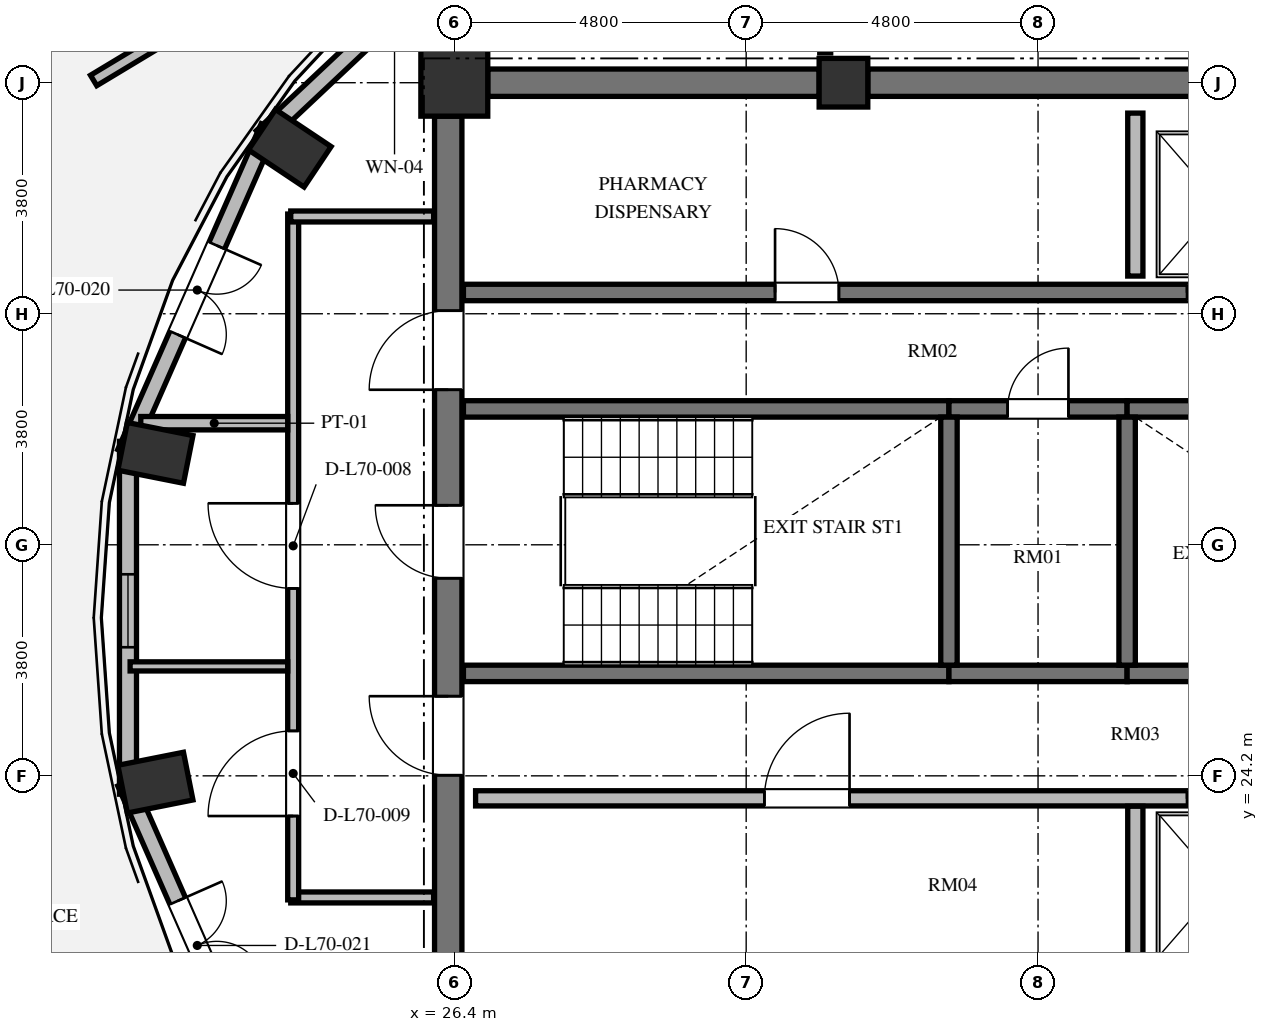
"""IFC4 building model, lengths in metres.
Left out: names, types, materials, properties, quantities, classifications, styles, units other than length and angle.
Written with IfcOpenShell. Run it as: python <this file> out.ifc"""

import sys

from ifc_helpers import new_model, si_unit, direction, frame, frame_2d, origin, origin_2d, place, context, subcontext, project, spatial, rectangle, extrude, element, fill, save


model = new_model("IFC4")
c1 = context("Model", 3, precision=1e-05, world=origin(), true_north=direction((0.0, 1.0)))
c2 = subcontext(c1, "Body", "Model", "MODEL_VIEW")
j1 = project(units=[si_unit("LENGTHUNIT", "METRE"), si_unit("PLANEANGLEUNIT", "RADIAN")], contexts=[c1])
p1 = place(None, origin())
s1 = spatial("IfcSite", under=j1, at=p1, CompositionType="ELEMENT")
p2 = place(p1, origin())
s2 = spatial("IfcBuilding", under=s1, at=p2, CompositionType="ELEMENT")
p3 = place(p2, frame((0.0, 0.0, 269.616)))
s3 = spatial("IfcBuildingStorey", under=s2, at=p3, CompositionType="ELEMENT", Elevation=269.616)
for number, where, z_axis, x_axis in (
    (1, (23.694, 34.522, 0.0), (0.0, 0.0, 1.0), (-0.831, 0.556, 0.0)),
    (2, (21.484, 29.512, 0.0), (0.0, 0.0, 1.0), (-0.981, 0.195, 0.0)),
    (3, (21.484, 24.088, 0.0), (0.0, 0.0, 1.0), (-0.981, -0.195, 0.0)),
):
    element("IfcColumn", number, at=place(p3, frame(where, z_axis=z_axis, x_axis=x_axis)), inside=s3, PredefinedType="COLUMN", context=c2, shape_type="SweptSolid", body=[
        extrude(rectangle(XDim=1.1, YDim=0.8, at=origin_2d()), origin(), (0.0, 0.0, 1.0), 3.648),
    ])
p4 = place(p3, frame((32.8, 35.6, 0.0), z_axis=(0.0, 0.0, 1.0), x_axis=(1.0, 0.0, 0.0)))
e4 = element("IfcColumn", 4, at=p4, inside=s3, PredefinedType="COLUMN", context=c2, shape_type="SweptSolid", body=[
    extrude(rectangle(XDim=0.8, YDim=0.8, at=origin_2d()), origin(), (0.0, 0.0, 1.0), 3.648),
])
p5 = place(p3, frame((26.4, 35.6, 0.0), z_axis=(0.0, 0.0, 1.0), x_axis=(1.0, 0.0, 0.0)))
e5 = element("IfcColumn", 5, at=p5, inside=s3, PredefinedType="COLUMN", context=c2, shape_type="SweptSolid", body=[
    extrude(rectangle(XDim=1.1, YDim=1.1, at=origin_2d()), origin(), (0.0, 0.0, 1.0), 3.648),
])
p6 = place(p3, frame((26.3, 20.95, 0.0), z_axis=(0.0, 0.0, 1.0), x_axis=(0.0, 1.0, 0.0)))
e6 = element("IfcWall", 6, at=p6, inside=s3, PredefinedType="SHEAR", context=c2, shape_type="SweptSolid", body=[
    extrude(rectangle(XDim=14.1, YDim=0.45, at=frame_2d((7.05, 0.0))), origin(), (0.0, 0.0, 1.0), 3.648),
])
p7 = place(p6, frame((6.5, 0.0, 0.0)))
e7 = element("IfcOpeningElement", 7, at=p7, cuts=e6, PredefinedType="OPENING", context=c2, shape_type="SweptSolid", body=[
    extrude(rectangle(XDim=1.2, YDim=2.15, at=frame_2d((0.6, 1.075))), frame((0.0, 0.235, 0.0), z_axis=(0.0, -1.0, 0.0), x_axis=(1.0, 0.0, 0.0)), (0.0, 0.0, 1.0), 0.47),
])
p8 = place(p6, frame((9.6, 0.0, 0.0)))
e8 = element("IfcOpeningElement", 8, at=p8, cuts=e6, PredefinedType="OPENING", context=c2, shape_type="SweptSolid", body=[
    extrude(rectangle(XDim=1.3, YDim=2.2, at=frame_2d((0.65, 1.1))), frame((0.0, 0.235, 0.0), z_axis=(0.0, -1.0, 0.0), x_axis=(1.0, 0.0, 0.0)), (0.0, 0.0, 1.0), 0.47),
])
p9 = place(p6, frame((3.26, 0.0, 0.0)))
e9 = element("IfcOpeningElement", 9, at=p9, cuts=e6, PredefinedType="OPENING", context=c2, shape_type="SweptSolid", body=[
    extrude(rectangle(XDim=1.3, YDim=2.2, at=frame_2d((0.65, 1.1))), frame((0.0, 0.235, 0.0), z_axis=(0.0, -1.0, 0.0), x_axis=(1.0, 0.0, 0.0)), (0.0, 0.0, 1.0), 0.47),
])
p10 = place(p3, frame((26.95, 35.6, 0.0), z_axis=(0.0, 0.0, 1.0), x_axis=(1.0, 0.0, 0.0)))
e10 = element("IfcWall", 10, at=p10, inside=s3, PredefinedType="SHEAR", context=c2, shape_type="SweptSolid", body=[
    extrude(rectangle(XDim=5.45, YDim=0.45, at=frame_2d((2.725, 0.0))), origin(), (0.0, 0.0, 1.0), 3.648),
])
p11 = place(p3, frame((33.2, 35.6, 0.0), z_axis=(0.0, 0.0, 1.0), x_axis=(1.0, 0.0, 0.0)))
e11 = element("IfcWall", 11, at=p11, inside=s3, PredefinedType="SHEAR", context=c2, shape_type="SweptSolid", body=[
    extrude(rectangle(XDim=5.6, YDim=0.45, at=frame_2d((2.8, 0.0))), origin(), (0.0, 0.0, 1.0), 3.648),
])
p12 = place(p3, frame((27.595, 38.808, 0.0), z_axis=(0.0, 0.0, 1.0), x_axis=(-0.728251519923, -0.685309947199, 0.0)))
e12 = element("IfcWall", 12, at=p12, inside=s3, PredefinedType="SOLIDWALL", context=c2, shape_type="SweptSolid", body=[
    extrude(rectangle(XDim=5.981, YDim=0.28, at=frame_2d((2.99, 0.0))), origin(), (0.0, 0.0, 1.0), 3.448),
])
p13 = place(p12, frame((2.391, 0.0, 0.85)))
e13 = element("IfcOpeningElement", 13, at=p13, cuts=e12, PredefinedType="OPENING", context=c2, shape_type="SweptSolid", body=[
    extrude(rectangle(XDim=1.2, YDim=1.8, at=frame_2d((0.6, 0.9))), frame((0.0, 0.15, 0.0), z_axis=(0.0, -1.0, 0.0), x_axis=(1.0, 0.0, 0.0)), (0.0, 0.0, 1.0), 0.3),
])
p14 = place(p3, frame((23.352, 34.869, 0.0), z_axis=(0.0, 0.0, 1.0), x_axis=(-0.402882523888, -0.915251698685, 0.0)))
e14 = element("IfcWall", 14, at=p14, inside=s3, PredefinedType="SOLIDWALL", context=c2, shape_type="SweptSolid", body=[
    extrude(rectangle(XDim=5.856, YDim=0.28, at=frame_2d((2.928, 0.0))), origin(), (0.0, 0.0, 1.0), 3.448),
])
p15 = place(p14, frame((2.128, 0.0, 0.0)))
e15 = element("IfcOpeningElement", 15, at=p15, cuts=e14, PredefinedType="OPENING", context=c2, shape_type="SweptSolid", body=[
    extrude(rectangle(XDim=1.6, YDim=2.3, at=frame_2d((0.8, 1.15))), frame((0.0, 0.15, 0.0), z_axis=(0.0, -1.0, 0.0), x_axis=(1.0, 0.0, 0.0)), (0.0, 0.0, 1.0), 0.3),
])
p16 = place(p3, frame((21.033, 29.701, 0.0), z_axis=(0.0, 0.0, 1.0), x_axis=(0.0, -1.0, 0.0)))
e16 = element("IfcWall", 16, at=p16, inside=s3, PredefinedType="SOLIDWALL", context=c2, shape_type="SweptSolid", body=[
    extrude(rectangle(XDim=5.803, YDim=0.28, at=frame_2d((2.901, 0.0))), origin(), (0.0, 0.0, 1.0), 3.448),
])
p17 = place(p16, frame((2.187, 0.0, 0.85)))
e17 = element("IfcOpeningElement", 17, at=p17, cuts=e16, PredefinedType="OPENING", context=c2, shape_type="SweptSolid", body=[
    extrude(rectangle(XDim=1.2, YDim=1.8, at=frame_2d((0.6, 0.9))), frame((0.0, 0.15, 0.0), z_axis=(0.0, -1.0, 0.0), x_axis=(1.0, 0.0, 0.0)), (0.0, 0.0, 1.0), 0.3),
])
p18 = place(p3, frame((20.993, 24.09, 0.0), z_axis=(0.0, 0.0, 1.0), x_axis=(0.402867150469, -0.91525846572, 0.0)))
e18 = element("IfcWall", 18, at=p18, inside=s3, PredefinedType="SOLIDWALL", context=c2, shape_type="SweptSolid", body=[
    extrude(rectangle(XDim=5.856, YDim=0.28, at=frame_2d((2.928, 0.0))), origin(), (0.0, 0.0, 1.0), 3.448),
])
p19 = place(p18, frame((2.128, 0.0, 0.0)))
e19 = element("IfcOpeningElement", 19, at=p19, cuts=e18, PredefinedType="OPENING", context=c2, shape_type="SweptSolid", body=[
    extrude(rectangle(XDim=1.6, YDim=2.3, at=frame_2d((0.8, 1.15))), frame((0.0, 0.15, 0.0), z_axis=(0.0, -1.0, 0.0), x_axis=(1.0, 0.0, 0.0)), (0.0, 0.0, 1.0), 0.3),
])
p20 = place(p3, frame((20.476, 37.094, 0.0), z_axis=(0.0, 0.0, 1.0), x_axis=(-0.746018095031, -0.665925672944, 0.0)))
e20 = element("IfcWall", 20, at=p20, inside=s3, PredefinedType="PARAPET", context=c2, shape_type="SweptSolid", body=[
    extrude(rectangle(XDim=3.877, YDim=0.24, at=frame_2d((1.939, 0.0))), origin(), (0.0, 0.0, 1.0), 1.2),
])
p21 = place(p3, frame((24.925, 38.321, 0.0), z_axis=(0.0, 0.0, 1.0), x_axis=(-0.856651190981, -0.515896052506, 0.0)))
e21 = element("IfcWall", 21, at=p21, inside=s3, PredefinedType="PARAPET", context=c2, shape_type="SweptSolid", body=[
    extrude(rectangle(XDim=5.202, YDim=0.2, at=frame_2d((2.601, 0.0))), origin(), (0.0, 0.0, 1.0), 0.55),
])
p22 = place(p3, frame((26.55, 30.235, 0.0), z_axis=(0.0, 0.0, 1.0), x_axis=(1.0, 0.0, 0.0)))
e22 = element("IfcWall", 22, at=p22, inside=s3, PredefinedType="SHEAR", context=c2, shape_type="SweptSolid", body=[
    extrude(rectangle(XDim=7.985, YDim=0.27, at=frame_2d((3.992, 0.0))), origin(), (0.0, 0.0, 1.0), 3.648),
])
p23 = place(p3, frame((34.535, 30.235, 0.0), z_axis=(0.0, 0.0, 1.0), x_axis=(1.0, 0.0, 0.0)))
e23 = element("IfcWall", 23, at=p23, inside=s3, PredefinedType="SHEAR", context=c2, shape_type="SweptSolid", body=[
    extrude(rectangle(XDim=2.93, YDim=0.27, at=frame_2d((1.465, 0.0))), origin(), (0.0, 0.0, 1.0), 3.648),
])
p24 = place(p23, frame((0.965, 0.0, 0.0)))
e24 = element("IfcOpeningElement", 24, at=p24, cuts=e23, PredefinedType="OPENING", context=c2, shape_type="SweptSolid", body=[
    extrude(rectangle(XDim=1.0, YDim=2.1, at=frame_2d((0.5, 1.05))), frame((0.0, 0.145, 0.0), z_axis=(0.0, -1.0, 0.0), x_axis=(1.0, 0.0, 0.0)), (0.0, 0.0, 1.0), 0.29),
])
p25 = place(p3, frame((37.465, 30.235, 0.0), z_axis=(0.0, 0.0, 1.0), x_axis=(1.0, 0.0, 0.0)))
e25 = element("IfcWall", 25, at=p25, inside=s3, PredefinedType="SHEAR", context=c2, shape_type="SweptSolid", body=[
    extrude(rectangle(XDim=7.985, YDim=0.27, at=frame_2d((3.992, 0.0))), origin(), (0.0, 0.0, 1.0), 3.648),
])
p26 = place(p25, frame((6.455, 0.0, 0.0)))
e26 = element("IfcOpeningElement", 26, at=p26, cuts=e25, PredefinedType="OPENING", context=c2, shape_type="SweptSolid", body=[
    extrude(rectangle(XDim=1.2, YDim=2.15, at=frame_2d((0.6, 1.075))), frame((0.0, 0.145, 0.0), z_axis=(0.0, -1.0, 0.0), x_axis=(1.0, 0.0, 0.0)), (0.0, 0.0, 1.0), 0.29),
])
p27 = place(p3, frame((26.55, 25.885, 0.0), z_axis=(0.0, 0.0, 1.0), x_axis=(1.0, 0.0, 0.0)))
e27 = element("IfcWall", 27, at=p27, inside=s3, PredefinedType="SHEAR", context=c2, shape_type="SweptSolid", body=[
    extrude(rectangle(XDim=7.985, YDim=0.27, at=frame_2d((3.992, 0.0))), origin(), (0.0, 0.0, 1.0), 3.648),
])
p28 = place(p3, frame((34.535, 25.885, 0.0), z_axis=(0.0, 0.0, 1.0), x_axis=(1.0, 0.0, 0.0)))
e28 = element("IfcWall", 28, at=p28, inside=s3, PredefinedType="SHEAR", context=c2, shape_type="SweptSolid", body=[
    extrude(rectangle(XDim=2.93, YDim=0.27, at=frame_2d((1.465, 0.0))), origin(), (0.0, 0.0, 1.0), 3.648),
])
p29 = place(p3, frame((37.465, 25.885, 0.0), z_axis=(0.0, 0.0, 1.0), x_axis=(1.0, 0.0, 0.0)))
e29 = element("IfcWall", 29, at=p29, inside=s3, PredefinedType="SHEAR", context=c2, shape_type="SweptSolid", body=[
    extrude(rectangle(XDim=7.985, YDim=0.27, at=frame_2d((3.992, 0.0))), origin(), (0.0, 0.0, 1.0), 3.648),
])
for number, where, z_axis, x_axis in (
    (30, (34.535, 26.02, 0.0), (0.0, 0.0, 1.0), (0.0, 1.0, 0.0)),
    (31, (37.465, 26.02, 0.0), (0.0, 0.0, 1.0), (0.0, 1.0, 0.0)),
):
    element("IfcWall", number, at=place(p3, frame(where, z_axis=z_axis, x_axis=x_axis)), inside=s3, PredefinedType="SHEAR", context=c2, shape_type="SweptSolid", body=[
        extrude(rectangle(XDim=4.08, YDim=0.27, at=frame_2d((2.04, 0.0))), origin(), (0.0, 0.0, 1.0), 3.648),
    ])
p30 = place(p3, frame((26.55, 32.15, 0.0), z_axis=(0.0, 0.0, 1.0), x_axis=(1.0, 0.0, 0.0)))
e32 = element("IfcWall", 32, at=p30, inside=s3, PredefinedType="SHEAR", context=c2, shape_type="SweptSolid", body=[
    extrude(rectangle(XDim=16.4, YDim=0.27, at=frame_2d((8.2, 0.0))), origin(), (0.0, 0.0, 1.0), 3.648),
])
p31 = place(p30, frame((5.125, 0.0, 0.0)))
e33 = element("IfcOpeningElement", 33, at=p31, cuts=e32, PredefinedType="OPENING", context=c2, shape_type="SweptSolid", body=[
    extrude(rectangle(XDim=1.05, YDim=2.15, at=frame_2d((0.525, 1.075))), frame((0.0, 0.145, 0.0), z_axis=(0.0, -1.0, 0.0), x_axis=(1.0, 0.0, 0.0)), (0.0, 0.0, 1.0), 0.29),
])
p32 = place(p30, frame((11.9, 0.0, 0.0)))
e34 = element("IfcOpeningElement", 34, at=p32, cuts=e32, PredefinedType="OPENING", context=c2, shape_type="SweptSolid", body=[
    extrude(rectangle(XDim=1.1, YDim=2.2, at=frame_2d((0.55, 1.1))), frame((0.0, 0.145, 0.0), z_axis=(0.0, -1.0, 0.0), x_axis=(1.0, 0.0, 0.0)), (0.0, 0.0, 1.0), 0.29),
])
p33 = place(p30, frame((14.5, 0.0, 0.0)))
e35 = element("IfcOpeningElement", 35, at=p33, cuts=e32, PredefinedType="OPENING", context=c2, shape_type="SweptSolid", body=[
    extrude(rectangle(XDim=1.1, YDim=2.2, at=frame_2d((0.55, 1.1))), frame((0.0, 0.145, 0.0), z_axis=(0.0, -1.0, 0.0), x_axis=(1.0, 0.0, 0.0)), (0.0, 0.0, 1.0), 0.29),
])
p34 = place(p3, frame((26.75, 23.83, 0.0), z_axis=(0.0, 0.0, 1.0), x_axis=(1.0, 0.0, 0.0)))
e36 = element("IfcWall", 36, at=p34, inside=s3, PredefinedType="SOLIDWALL", context=c2, shape_type="SweptSolid", body=[
    extrude(rectangle(XDim=16.2, YDim=0.25, at=frame_2d((8.1, 0.0))), origin(), (0.0, 0.0, 1.0), 3.448),
])
p35 = place(p34, frame((4.75, 0.0, 0.0)))
e37 = element("IfcOpeningElement", 37, at=p35, cuts=e36, PredefinedType="OPENING", context=c2, shape_type="SweptSolid", body=[
    extrude(rectangle(XDim=1.4, YDim=2.2, at=frame_2d((0.7, 1.1))), frame((0.0, 0.135, 0.0), z_axis=(0.0, -1.0, 0.0), x_axis=(1.0, 0.0, 0.0)), (0.0, 0.0, 1.0), 0.27),
])
p36 = place(p34, frame((11.7, 0.0, 0.0)))
e38 = element("IfcOpeningElement", 38, at=p36, cuts=e36, PredefinedType="OPENING", context=c2, shape_type="SweptSolid", body=[
    extrude(rectangle(XDim=1.1, YDim=2.2, at=frame_2d((0.55, 1.1))), frame((0.0, 0.135, 0.0), z_axis=(0.0, -1.0, 0.0), x_axis=(1.0, 0.0, 0.0)), (0.0, 0.0, 1.0), 0.27),
])
p37 = place(p34, frame((14.15, 0.0, 0.0)))
e39 = element("IfcOpeningElement", 39, at=p37, cuts=e36, PredefinedType="OPENING", context=c2, shape_type="SweptSolid", body=[
    extrude(rectangle(XDim=1.4, YDim=2.3, at=frame_2d((0.7, 1.15))), frame((0.0, 0.135, 0.0), z_axis=(0.0, -1.0, 0.0), x_axis=(1.0, 0.0, 0.0)), (0.0, 0.0, 1.0), 0.27),
])
p38 = place(p3, frame((37.6, 32.42, 0.0), z_axis=(0.0, 0.0, 1.0), x_axis=(0.0, 1.0, 0.0)))
e40 = element("IfcWall", 40, at=p38, inside=s3, PredefinedType="SOLIDWALL", context=c2, shape_type="SweptSolid", body=[
    extrude(rectangle(XDim=2.68, YDim=0.25, at=frame_2d((1.34, 0.0))), origin(), (0.0, 0.0, 1.0), 3.448),
])
p39 = place(p3, frame((37.6, 20.9, 0.0), z_axis=(0.0, 0.0, 1.0), x_axis=(0.0, 1.0, 0.0)))
e41 = element("IfcWall", 41, at=p39, inside=s3, PredefinedType="SOLIDWALL", context=c2, shape_type="SweptSolid", body=[
    extrude(rectangle(XDim=2.8, YDim=0.25, at=frame_2d((1.4, 0.0))), origin(), (0.0, 0.0, 1.0), 3.448),
])
p40 = place(p3, frame((32.5, 36.09, 0.0), z_axis=(0.0, 0.0, 1.0), x_axis=(0.0, 1.0, 0.0)))
e42 = element("IfcWall", 42, at=p40, inside=s3, PredefinedType="PARTITIONING", context=c2, shape_type="SweptSolid", body=[
    extrude(rectangle(XDim=2.35, YDim=0.18, at=frame_2d((1.175, 0.0))), origin(), (0.0, 0.0, 1.0), 3.448),
])
p41 = place(p3, frame((26.06, 22.2, 0.0), z_axis=(0.0, 0.0, 1.0), x_axis=(-1.0, 0.0, 0.0)))
e43 = element("IfcWall", 43, at=p41, inside=s3, PredefinedType="PARTITIONING", context=c2, shape_type="SweptSolid", body=[
    extrude(rectangle(XDim=2.35, YDim=0.18, at=frame_2d((1.175, 0.0))), origin(), (0.0, 0.0, 1.0), 3.448),
])
p42 = place(p3, frame((23.75, 22.16, 0.0), z_axis=(0.0, 0.0, 1.0), x_axis=(0.0, 1.0, 0.0)))
e44 = element("IfcWall", 44, at=p42, inside=s3, PredefinedType="PARTITIONING", context=c2, shape_type="SweptSolid", body=[
    extrude(rectangle(XDim=11.28, YDim=0.18, at=frame_2d((5.64, 0.0))), origin(), (0.0, 0.0, 1.0), 3.448),
])
p43 = place(p42, frame((5.123, 0.0, 0.0)))
e45 = element("IfcOpeningElement", 45, at=p43, cuts=e44, PredefinedType="OPENING", context=c2, shape_type="SweptSolid", body=[
    extrude(rectangle(XDim=1.4, YDim=2.2, at=frame_2d((0.7, 1.1))), frame((0.0, 0.1, 0.0), z_axis=(0.0, -1.0, 0.0), x_axis=(1.0, 0.0, 0.0)), (0.0, 0.0, 1.0), 0.2),
])
p44 = place(p42, frame((1.379, 0.0, 0.0)))
e46 = element("IfcOpeningElement", 46, at=p44, cuts=e44, PredefinedType="OPENING", context=c2, shape_type="SweptSolid", body=[
    extrude(rectangle(XDim=1.4, YDim=2.2, at=frame_2d((0.7, 1.1))), frame((0.0, 0.1, 0.0), z_axis=(0.0, -1.0, 0.0), x_axis=(1.0, 0.0, 0.0)), (0.0, 0.0, 1.0), 0.2),
])
p45 = place(p3, frame((23.71, 33.4, 0.0), z_axis=(0.0, 0.0, 1.0), x_axis=(1.0, 0.0, 0.0)))
e47 = element("IfcWall", 47, at=p45, inside=s3, PredefinedType="PARTITIONING", context=c2, shape_type="SweptSolid", body=[
    extrude(rectangle(XDim=2.35, YDim=0.18, at=frame_2d((1.175, 0.0))), origin(), (0.0, 0.0, 1.0), 3.448),
])
p46 = place(p3, frame((21.068, 26.0, 0.0), z_axis=(0.0, 0.0, 1.0), x_axis=(1.0, 0.0, 0.0)))
e48 = element("IfcWall", 48, at=p46, inside=s3, PredefinedType="PARTITIONING", context=c2, shape_type="SweptSolid", body=[
    extrude(rectangle(XDim=2.592, YDim=0.15, at=frame_2d((1.296, 0.0))), origin(), (0.0, 0.0, 1.0), 3.448),
])
p47 = place(p3, frame((21.244, 30.0, 0.0), z_axis=(0.0, 0.0, 1.0), x_axis=(1.0, 0.0, 0.0)))
e49 = element("IfcWall", 49, at=p47, inside=s3, PredefinedType="PARTITIONING", context=c2, shape_type="SweptSolid", body=[
    extrude(rectangle(XDim=2.416, YDim=0.22, at=frame_2d((1.208, 0.0))), origin(), (0.0, 0.0, 1.0), 3.448),
])
p48 = place(p15, origin())
e50 = element("IfcDoor", 50, at=p48, inside=s3, OperationType="DOUBLE_DOOR_SINGLE_SWING", PredefinedType="DOOR", context=c2, shape_type="SweptSolid", body=[
    extrude(rectangle(XDim=1.6, YDim=2.3, at=frame_2d((0.8, 1.15))), frame((0.0, 0.025, 0.0), z_axis=(0.0, -1.0, 0.0), x_axis=(1.0, 0.0, 0.0)), (0.0, 0.0, 1.0), 0.05),
])
fill(e15, e50)
p49 = place(p17, origin())
e51 = element("IfcWindow", 51, at=p49, inside=s3, PartitioningType="SINGLE_PANEL", PredefinedType="WINDOW", context=c2, shape_type="SweptSolid", body=[
    extrude(rectangle(XDim=1.2, YDim=1.8, at=frame_2d((0.6, 0.9))), frame((0.0, 0.03, 0.0), z_axis=(0.0, -1.0, 0.0), x_axis=(1.0, 0.0, 0.0)), (0.0, 0.0, 1.0), 0.06),
])
fill(e17, e51)
p50 = place(p19, origin())
e52 = element("IfcDoor", 52, at=p50, inside=s3, OperationType="DOUBLE_DOOR_SINGLE_SWING", PredefinedType="DOOR", context=c2, shape_type="SweptSolid", body=[
    extrude(rectangle(XDim=1.6, YDim=2.3, at=frame_2d((0.8, 1.15))), frame((0.0, 0.025, 0.0), z_axis=(0.0, -1.0, 0.0), x_axis=(1.0, 0.0, 0.0)), (0.0, 0.0, 1.0), 0.05),
])
fill(e19, e52)
p51 = place(p7, origin())
e53 = element("IfcDoor", 53, at=p51, inside=s3, OperationType="SINGLE_SWING_RIGHT", PredefinedType="DOOR", context=c2, shape_type="SweptSolid", body=[
    extrude(rectangle(XDim=1.2, YDim=2.15, at=frame_2d((0.6, 1.075))), frame((0.0, 0.025, 0.0), z_axis=(0.0, -1.0, 0.0), x_axis=(1.0, 0.0, 0.0)), (0.0, 0.0, 1.0), 0.05),
])
fill(e7, e53)
p52 = place(p24, origin())
e54 = element("IfcDoor", 54, at=p52, inside=s3, OperationType="SINGLE_SWING_RIGHT", PredefinedType="DOOR", context=c2, shape_type="SweptSolid", body=[
    extrude(rectangle(XDim=1.0, YDim=2.1, at=frame_2d((0.5, 1.05))), frame((0.0, 0.025, 0.0), z_axis=(0.0, -1.0, 0.0), x_axis=(1.0, 0.0, 0.0)), (0.0, 0.0, 1.0), 0.05),
])
fill(e24, e54)
p53 = place(p8, origin())
e55 = element("IfcDoor", 55, at=p53, inside=s3, OperationType="SINGLE_SWING_LEFT", PredefinedType="DOOR", context=c2, shape_type="SweptSolid", body=[
    extrude(rectangle(XDim=1.3, YDim=2.2, at=frame_2d((0.65, 1.1))), frame((0.0, 0.025, 0.0), z_axis=(0.0, -1.0, 0.0), x_axis=(1.0, 0.0, 0.0)), (0.0, 0.0, 1.0), 0.05),
])
fill(e8, e55)
p54 = place(p9, origin())
e56 = element("IfcDoor", 56, at=p54, inside=s3, OperationType="SINGLE_SWING_RIGHT", PredefinedType="DOOR", context=c2, shape_type="SweptSolid", body=[
    extrude(rectangle(XDim=1.3, YDim=2.2, at=frame_2d((0.65, 1.1))), frame((0.0, 0.025, 0.0), z_axis=(0.0, -1.0, 0.0), x_axis=(1.0, 0.0, 0.0)), (0.0, 0.0, 1.0), 0.05),
])
fill(e9, e56)
p55 = place(p31, origin())
e57 = element("IfcDoor", 57, at=p55, inside=s3, OperationType="SINGLE_SWING_LEFT", PredefinedType="DOOR", context=c2, shape_type="SweptSolid", body=[
    extrude(rectangle(XDim=1.05, YDim=2.15, at=frame_2d((0.525, 1.075))), frame((0.0, 0.025, 0.0), z_axis=(0.0, -1.0, 0.0), x_axis=(1.0, 0.0, 0.0)), (0.0, 0.0, 1.0), 0.05),
])
fill(e33, e57)
p56 = place(p35, origin())
e58 = element("IfcDoor", 58, at=p56, inside=s3, OperationType="SINGLE_SWING_RIGHT", PredefinedType="DOOR", context=c2, shape_type="SweptSolid", body=[
    extrude(rectangle(XDim=1.4, YDim=2.2, at=frame_2d((0.7, 1.1))), frame((0.0, 0.025, 0.0), z_axis=(0.0, -1.0, 0.0), x_axis=(1.0, 0.0, 0.0)), (0.0, 0.0, 1.0), 0.05),
])
fill(e37, e58)
p57 = place(p32, origin())
e59 = element("IfcDoor", 59, at=p57, inside=s3, OperationType="SLIDING_TO_LEFT", PredefinedType="DOOR", context=c2, shape_type="SweptSolid", body=[
    extrude(rectangle(XDim=1.1, YDim=2.2, at=frame_2d((0.55, 1.1))), frame((0.0, 0.025, 0.0), z_axis=(0.0, -1.0, 0.0), x_axis=(1.0, 0.0, 0.0)), (0.0, 0.0, 1.0), 0.05),
])
fill(e34, e59)
p58 = place(p36, origin())
e60 = element("IfcDoor", 60, at=p58, inside=s3, OperationType="SLIDING_TO_LEFT", PredefinedType="DOOR", context=c2, shape_type="SweptSolid", body=[
    extrude(rectangle(XDim=1.1, YDim=2.2, at=frame_2d((0.55, 1.1))), frame((0.0, 0.025, 0.0), z_axis=(0.0, -1.0, 0.0), x_axis=(1.0, 0.0, 0.0)), (0.0, 0.0, 1.0), 0.05),
])
fill(e38, e60)
p59 = place(p43, origin())
e61 = element("IfcDoor", 61, at=p59, inside=s3, OperationType="SINGLE_SWING_RIGHT", PredefinedType="DOOR", context=c2, shape_type="SweptSolid", body=[
    extrude(rectangle(XDim=1.4, YDim=2.2, at=frame_2d((0.7, 1.1))), frame((0.0, 0.025, 0.0), z_axis=(0.0, -1.0, 0.0), x_axis=(1.0, 0.0, 0.0)), (0.0, 0.0, 1.0), 0.05),
])
fill(e45, e61)
p60 = place(p44, origin())
e62 = element("IfcDoor", 62, at=p60, inside=s3, OperationType="SINGLE_SWING_LEFT", PredefinedType="DOOR", context=c2, shape_type="SweptSolid", body=[
    extrude(rectangle(XDim=1.4, YDim=2.2, at=frame_2d((0.7, 1.1))), frame((0.0, 0.025, 0.0), z_axis=(0.0, -1.0, 0.0), x_axis=(1.0, 0.0, 0.0)), (0.0, 0.0, 1.0), 0.05),
])
fill(e46, e62)
save(model, sys.argv[1])
